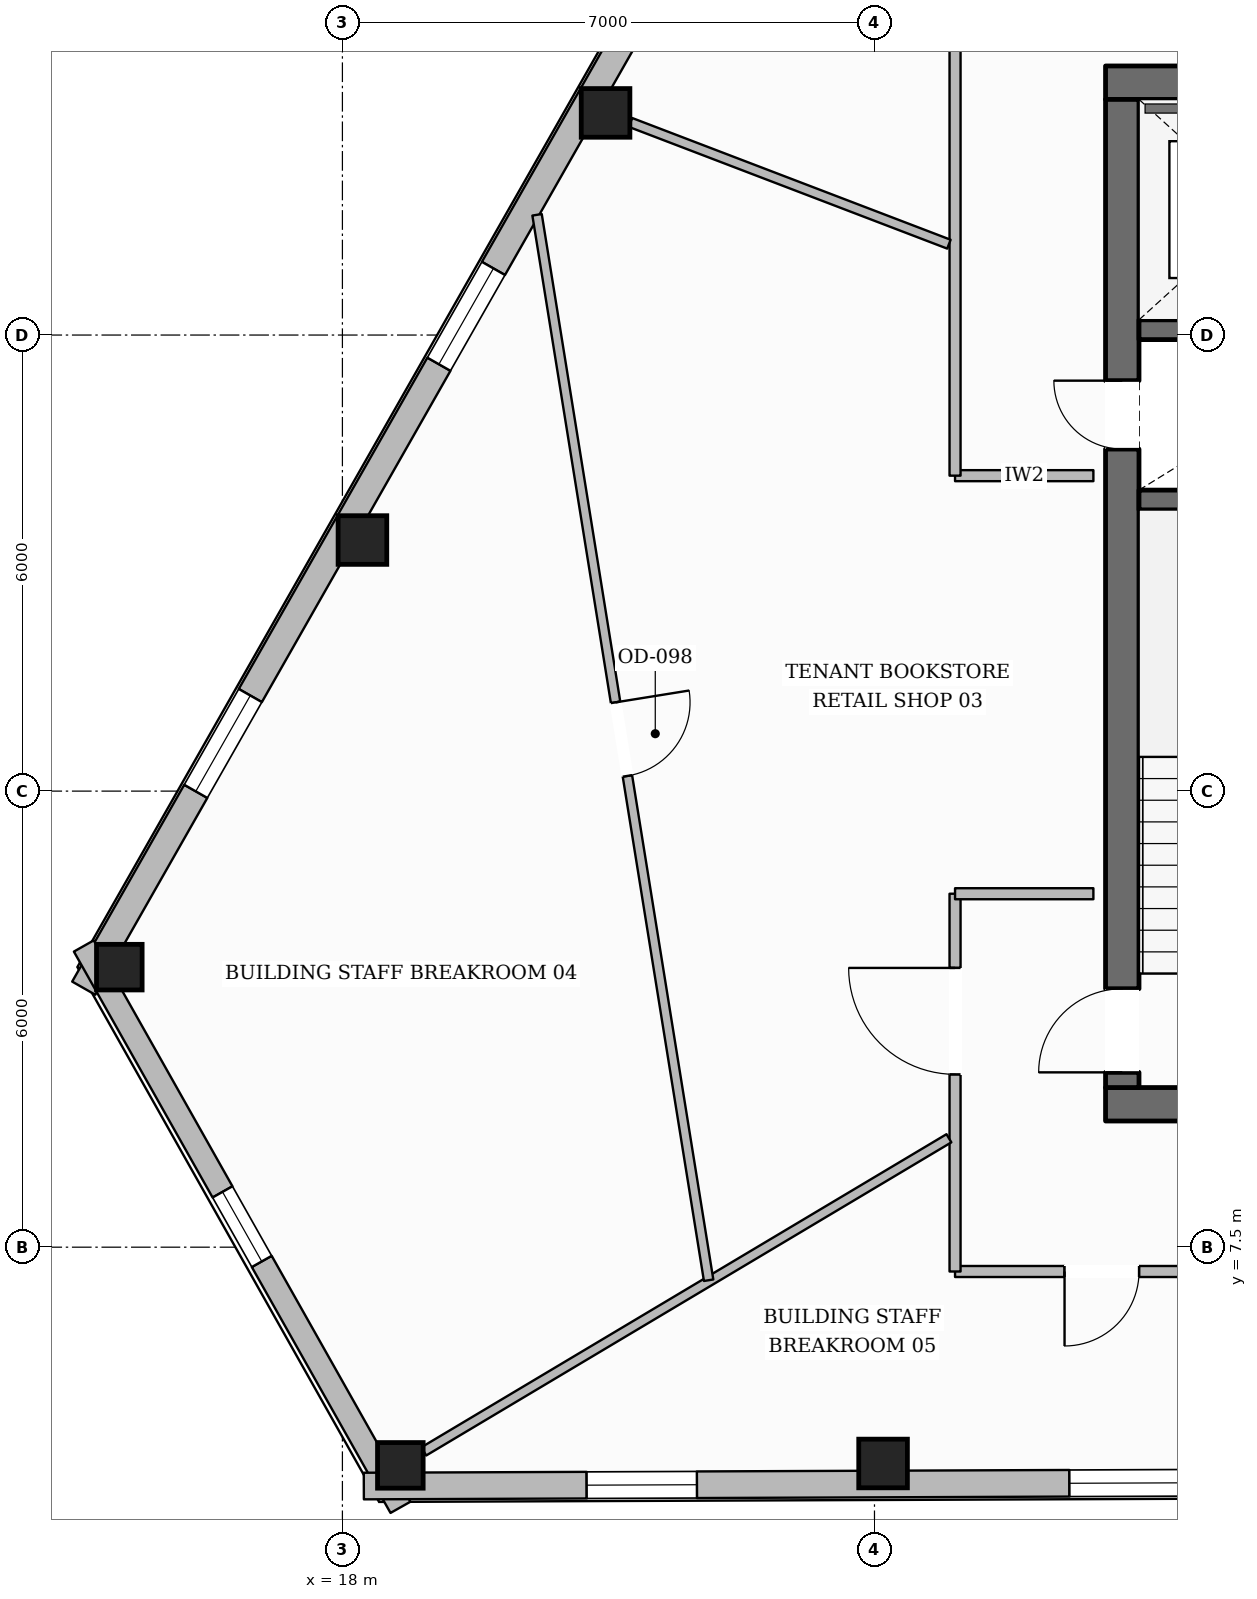
"""IFC4 building model, lengths in metres.
Left out: names, types, materials, properties, quantities, classifications, styles, units other than length and angle.
Written with IfcOpenShell. Run it as: python <this file> out.ifc"""

import sys

from ifc_helpers import new_model, si_unit, direction, frame, frame_2d, origin, origin_2d, place, context, subcontext, project, spatial, rectangle, hollow_rectangle, extrude, element, fill, save


model = new_model("IFC4")
c1 = context("Model", 3, precision=1e-05, world=origin(), true_north=direction((0.0, 1.0)))
c2 = subcontext(c1, "Body", "Model", "MODEL_VIEW")
j1 = project(units=[si_unit("LENGTHUNIT", "METRE"), si_unit("PLANEANGLEUNIT", "RADIAN")], contexts=[c1])
p1 = place(None, origin())
s1 = spatial("IfcSite", under=j1, at=p1, CompositionType="ELEMENT")
p2 = place(p1, origin())
s2 = spatial("IfcBuilding", under=s1, at=p2, CompositionType="ELEMENT")
p3 = place(p2, frame((0.0, 0.0, 230.45)))
s3 = spatial("IfcBuildingStorey", under=s2, at=p3, CompositionType="ELEMENT", Elevation=230.45)
p4 = place(p3, frame((28.04, 9.38, 0.0), z_axis=(0.0, 0.0, 1.0), x_axis=(1.0, 0.0, 0.0)))
e1 = element("IfcWall", 1, at=p4, inside=s3, PredefinedType="SOLIDWALL", context=c2, shape_type="SweptSolid", body=[
    extrude(rectangle(XDim=19.92, YDim=0.44, at=frame_2d((9.96, 0.0))), origin(), (0.0, 0.0, 1.0), 3.43),
])
p5 = place(p4, frame((10.46, 0.0, 0.0)))
e2 = element("IfcOpeningElement", 2, at=p5, cuts=e1, PredefinedType="OPENING", context=c2, shape_type="SweptSolid", body=[
    extrude(rectangle(XDim=1.4, YDim=2.2, at=frame_2d((0.7, 1.1))), frame((0.0, 0.23, 0.0), z_axis=(0.0, -1.0, 0.0), x_axis=(1.0, 0.0, 0.0)), (0.0, 0.0, 1.0), 0.46),
])
p6 = place(p3, frame((28.04, 22.82, 0.0), z_axis=(0.0, 0.0, 1.0), x_axis=(1.0, 0.0, 0.0)))
e3 = element("IfcWall", 3, at=p6, inside=s3, PredefinedType="SOLIDWALL", context=c2, shape_type="SweptSolid", body=[
    extrude(rectangle(XDim=19.92, YDim=0.44, at=frame_2d((9.96, 0.0))), origin(), (0.0, 0.0, 1.0), 3.43),
])
p7 = place(p6, frame((6.235, 0.0, 0.0)))
e4 = element("IfcOpeningElement", 4, at=p7, cuts=e3, PredefinedType="OPENING", context=c2, shape_type="SweptSolid", body=[
    extrude(rectangle(XDim=1.05, YDim=2.15, at=frame_2d((0.525, 1.075))), frame((0.0, 0.23, 0.0), z_axis=(0.0, -1.0, 0.0), x_axis=(1.0, 0.0, 0.0)), (0.0, 0.0, 1.0), 0.46),
])
p8 = place(p6, frame((12.635, 0.0, 0.0)))
e5 = element("IfcOpeningElement", 5, at=p8, cuts=e3, PredefinedType="OPENING", context=c2, shape_type="SweptSolid", body=[
    extrude(rectangle(XDim=1.05, YDim=2.15, at=frame_2d((0.525, 1.075))), frame((0.0, 0.23, 0.0), z_axis=(0.0, -1.0, 0.0), x_axis=(1.0, 0.0, 0.0)), (0.0, 0.0, 1.0), 0.46),
])
p9 = place(p3, frame((28.26, 9.6, 0.0), z_axis=(0.0, 0.0, 1.0), x_axis=(0.0, 1.0, 0.0)))
e6 = element("IfcWall", 6, at=p9, inside=s3, PredefinedType="SOLIDWALL", context=c2, shape_type="SweptSolid", body=[
    extrude(rectangle(XDim=13.0, YDim=0.44, at=frame_2d((6.5, 0.0))), origin(), (0.0, 0.0, 1.0), 3.43),
])
p10 = place(p9, frame((0.2, 0.0, 0.0)))
e7 = element("IfcOpeningElement", 7, at=p10, cuts=e6, PredefinedType="OPENING", context=c2, shape_type="SweptSolid", body=[
    extrude(rectangle(XDim=1.1, YDim=2.15, at=frame_2d((0.55, 1.075))), frame((0.0, 0.23, 0.0), z_axis=(0.0, -1.0, 0.0), x_axis=(1.0, 0.0, 0.0)), (0.0, 0.0, 1.0), 0.46),
])
p11 = place(p9, frame((8.4, 0.0, 0.0)))
e8 = element("IfcOpeningElement", 8, at=p11, cuts=e6, PredefinedType="OPENING", context=c2, shape_type="SweptSolid", body=[
    extrude(rectangle(XDim=0.9, YDim=2.1, at=frame_2d((0.45, 1.05))), frame((0.0, 0.23, 0.0), z_axis=(0.0, -1.0, 0.0), x_axis=(1.0, 0.0, 0.0)), (0.0, 0.0, 1.0), 0.46),
])
for number, where, z_axis, x_axis in (
    (9, (28.48, 17.33, 0.0), (0.0, 0.0, 1.0), (1.0, 0.0, 0.0)),
    (10, (28.48, 19.57, 0.0), (0.0, 0.0, 1.0), (1.0, 0.0, 0.0)),
):
    element("IfcWall", number, at=place(p3, frame(where, z_axis=z_axis, x_axis=x_axis)), inside=s3, PredefinedType="SHEAR", context=c2, shape_type="SweptSolid", body=[
        extrude(rectangle(XDim=3.2, YDim=0.26, at=frame_2d((1.6, 0.0))), origin(), (0.0, 0.0, 1.0), 3.43),
    ])
for number, where, z_axis, x_axis in (
    (11, (21.462, 22.422, 0.0), (0.0, 0.0, 1.0), (1.0, 0.0, 0.0)),
    (12, (18.264, 16.803, 0.0), (0.0, 0.0, 1.0), (1.0, 0.0, 0.0)),
):
    element("IfcColumn", number, at=place(p3, frame(where, z_axis=z_axis, x_axis=x_axis)), inside=s3, PredefinedType="COLUMN", context=c2, shape_type="SweptSolid", body=[
        extrude(hollow_rectangle(XDim=0.64, YDim=0.64, WallThickness=0.028, at=origin_2d()), origin(), (0.0, 0.0, 1.0), 3.43),
    ])
for number, where, z_axis, x_axis in (
    (13, (15.065, 11.184, 0.0), (0.0, 0.0, 1.0), (1.0, 0.0, 0.0)),
    (14, (18.762, 4.629, 0.0), (0.0, 0.0, 1.0), (1.0, 0.0, 0.0)),
):
    element("IfcColumn", number, at=place(p3, frame(where, z_axis=z_axis, x_axis=x_axis)), inside=s3, PredefinedType="COLUMN", context=c2, shape_type="SweptSolid", body=[
        extrude(hollow_rectangle(XDim=0.6, YDim=0.6, WallThickness=0.028, at=origin_2d()), origin(), (0.0, 0.0, 1.0), 3.43),
    ])
p12 = place(p3, frame((25.113, 4.654, 0.0), z_axis=(0.0, 0.0, 1.0), x_axis=(1.0, 0.0, 0.0)))
e15 = element("IfcColumn", 15, at=p12, inside=s3, PredefinedType="COLUMN", context=c2, shape_type="SweptSolid", body=[
    extrude(hollow_rectangle(XDim=0.64, YDim=0.64, WallThickness=0.028, at=origin_2d()), origin(), (0.0, 0.0, 1.0), 3.43),
])
p13 = place(p3, frame((14.597, 10.907, 0.0), z_axis=(0.0, 0.0, 1.0), x_axis=(0.494693460531, 0.869067534837, 0.0)))
e16 = element("IfcWall", 16, at=p13, inside=s3, PredefinedType="STANDARD", context=c2, shape_type="SweptSolid", body=[
    extrude(rectangle(XDim=39.744, YDim=0.35, at=frame_2d((19.872, 0.0))), origin(), (0.0, 0.0, 1.0), 2.962),
])
p14 = place(p13, frame((35.308, 0.0, 0.55)))
e17 = element("IfcOpeningElement", 17, at=p14, cuts=e16, PredefinedType="OPENING", context=c2, shape_type="SweptSolid", body=[
    extrude(rectangle(XDim=1.45, YDim=1.6, at=frame_2d((0.725, 0.8))), frame((0.0, 0.185, 0.0), z_axis=(0.0, -1.0, 0.0), x_axis=(1.0, 0.0, 0.0)), (0.0, 0.0, 1.0), 0.37),
])
p15 = place(p13, frame((28.843, 0.0, 0.55)))
e18 = element("IfcOpeningElement", 18, at=p15, cuts=e16, PredefinedType="OPENING", context=c2, shape_type="SweptSolid", body=[
    extrude(rectangle(XDim=1.45, YDim=1.6, at=frame_2d((0.725, 0.8))), frame((0.0, 0.185, 0.0), z_axis=(0.0, -1.0, 0.0), x_axis=(1.0, 0.0, 0.0)), (0.0, 0.0, 1.0), 0.37),
])
p16 = place(p13, frame((22.377, 0.0, 0.55)))
e19 = element("IfcOpeningElement", 19, at=p16, cuts=e16, PredefinedType="OPENING", context=c2, shape_type="SweptSolid", body=[
    extrude(rectangle(XDim=1.45, YDim=1.6, at=frame_2d((0.725, 0.8))), frame((0.0, 0.185, 0.0), z_axis=(0.0, -1.0, 0.0), x_axis=(1.0, 0.0, 0.0)), (0.0, 0.0, 1.0), 0.37),
])
p17 = place(p13, frame((9.446, 0.0, 0.55)))
e20 = element("IfcOpeningElement", 20, at=p17, cuts=e16, PredefinedType="OPENING", context=c2, shape_type="SweptSolid", body=[
    extrude(rectangle(XDim=1.45, YDim=1.6, at=frame_2d((0.725, 0.8))), frame((0.0, 0.185, 0.0), z_axis=(0.0, -1.0, 0.0), x_axis=(1.0, 0.0, 0.0)), (0.0, 0.0, 1.0), 0.37),
])
p18 = place(p13, frame((2.98, 0.0, 0.55)))
e21 = element("IfcOpeningElement", 21, at=p18, cuts=e16, PredefinedType="OPENING", context=c2, shape_type="SweptSolid", body=[
    extrude(rectangle(XDim=1.45, YDim=1.6, at=frame_2d((0.725, 0.8))), frame((0.0, 0.185, 0.0), z_axis=(0.0, -1.0, 0.0), x_axis=(1.0, 0.0, 0.0)), (0.0, 0.0, 1.0), 0.37),
])
p19 = place(p3, frame((18.764, 4.077, 0.0), z_axis=(0.0, 0.0, 1.0), x_axis=(-0.491297103915, 0.870992052595, 0.0)))
e22 = element("IfcWall", 22, at=p19, inside=s3, PredefinedType="STANDARD", context=c2, shape_type="SweptSolid", body=[
    extrude(rectangle(XDim=8.479, YDim=0.3, at=frame_2d((4.24, 0.0))), origin(), (0.0, 0.0, 1.0), 2.962),
])
p20 = place(p19, frame((3.715, 0.0, 0.65)))
e23 = element("IfcOpeningElement", 23, at=p20, cuts=e22, PredefinedType="OPENING", context=c2, shape_type="SweptSolid", body=[
    extrude(rectangle(XDim=1.05, YDim=1.55, at=frame_2d((0.525, 0.775))), frame((0.0, 0.16, 0.0), z_axis=(0.0, -1.0, 0.0), x_axis=(1.0, 0.0, 0.0)), (0.0, 0.0, 1.0), 0.32),
])
p21 = place(p3, frame((57.346, 4.51, 0.0), z_axis=(0.0, 0.0, 1.0), x_axis=(-0.999992347121, -0.003912249994, 0.0)))
e24 = element("IfcWall", 24, at=p21, inside=s3, PredefinedType="STANDARD", context=c2, shape_type="SweptSolid", body=[
    extrude(rectangle(XDim=39.065, YDim=0.35, at=frame_2d((19.532, 0.0))), origin(), (0.0, 0.0, 1.0), 2.962),
])
p22 = place(p21, frame((9.366, 0.0, 0.0)))
e25 = element("IfcOpeningElement", 25, at=p22, cuts=e24, PredefinedType="OPENING", context=c2, shape_type="SweptSolid", body=[
    extrude(rectangle(XDim=1.0, YDim=2.2, at=frame_2d((0.5, 1.1))), frame((0.0, 0.185, 0.0), z_axis=(0.0, -1.0, 0.0), x_axis=(1.0, 0.0, 0.0)), (0.0, 0.0, 1.0), 0.37),
])
p23 = place(p21, frame((34.683, 0.0, 0.55)))
e26 = element("IfcOpeningElement", 26, at=p23, cuts=e24, PredefinedType="OPENING", context=c2, shape_type="SweptSolid", body=[
    extrude(rectangle(XDim=1.45, YDim=1.6, at=frame_2d((0.725, 0.8))), frame((0.0, 0.185, 0.0), z_axis=(0.0, -1.0, 0.0), x_axis=(1.0, 0.0, 0.0)), (0.0, 0.0, 1.0), 0.37),
])
p24 = place(p21, frame((28.332, 0.0, 0.55)))
e27 = element("IfcOpeningElement", 27, at=p24, cuts=e24, PredefinedType="OPENING", context=c2, shape_type="SweptSolid", body=[
    extrude(rectangle(XDim=1.45, YDim=1.6, at=frame_2d((0.725, 0.8))), frame((0.0, 0.185, 0.0), z_axis=(0.0, -1.0, 0.0), x_axis=(1.0, 0.0, 0.0)), (0.0, 0.0, 1.0), 0.37),
])
p25 = place(p21, frame((21.981, 0.0, 0.55)))
e28 = element("IfcOpeningElement", 28, at=p25, cuts=e24, PredefinedType="OPENING", context=c2, shape_type="SweptSolid", body=[
    extrude(rectangle(XDim=1.45, YDim=1.6, at=frame_2d((0.725, 0.8))), frame((0.0, 0.185, 0.0), z_axis=(0.0, -1.0, 0.0), x_axis=(1.0, 0.0, 0.0)), (0.0, 0.0, 1.0), 0.37),
])
p26 = place(p21, frame((2.928, 0.0, 0.55)))
e29 = element("IfcOpeningElement", 29, at=p26, cuts=e24, PredefinedType="OPENING", context=c2, shape_type="SweptSolid", body=[
    extrude(rectangle(XDim=1.45, YDim=1.6, at=frame_2d((0.725, 0.8))), frame((0.0, 0.185, 0.0), z_axis=(0.0, -1.0, 0.0), x_axis=(1.0, 0.0, 0.0)), (0.0, 0.0, 1.0), 0.37),
])
p27 = place(p3, frame((27.88, 17.65, 0.0), z_axis=(0.0, 0.0, 1.0), x_axis=(-1.0, 0.0, 0.0)))
e30 = element("IfcWall", 30, at=p27, inside=s3, PredefinedType="PARTITIONING", context=c2, shape_type="SweptSolid", body=[
    extrude(rectangle(XDim=1.82, YDim=0.145, at=frame_2d((0.91, 0.0))), origin(), (0.0, 0.0, 1.0), 3.43),
])
p28 = place(p3, frame((26.06, 17.65, 0.0), z_axis=(0.0, 0.0, 1.0), x_axis=(0.0, 1.0, 0.0)))
e31 = element("IfcWall", 31, at=p28, inside=s3, PredefinedType="PARTITIONING", context=c2, shape_type="SweptSolid", body=[
    extrude(rectangle(XDim=7.37, YDim=0.145, at=frame_2d((3.685, 0.0))), origin(), (0.0, 0.0, 1.0), 3.169),
])
p29 = place(p3, frame((49.94, 7.18, 0.0), z_axis=(0.0, 0.0, 1.0), x_axis=(-1.0, 0.0, 0.0)))
e32 = element("IfcWall", 32, at=p29, inside=s3, PredefinedType="PARTITIONING", context=c2, shape_type="SweptSolid", body=[
    extrude(rectangle(XDim=23.88, YDim=0.145, at=frame_2d((11.94, 0.0))), origin(), (0.0, 0.0, 1.0), 3.169),
])
p30 = place(p29, frame((18.5, 0.0, 0.0)))
e33 = element("IfcOpeningElement", 33, at=p30, cuts=e32, PredefinedType="OPENING", context=c2, shape_type="SweptSolid", body=[
    extrude(rectangle(XDim=0.88, YDim=2.1, at=frame_2d((0.44, 1.05))), frame((0.0, 0.083, 0.0), z_axis=(0.0, -1.0, 0.0), x_axis=(1.0, 0.0, 0.0)), (0.0, 0.0, 1.0), 0.165),
])
p31 = place(p29, frame((15.98, 0.0, 0.0)))
e34 = element("IfcOpeningElement", 34, at=p31, cuts=e32, PredefinedType="OPENING", context=c2, shape_type="SweptSolid", body=[
    extrude(rectangle(XDim=0.88, YDim=2.1, at=frame_2d((0.44, 1.05))), frame((0.0, 0.083, 0.0), z_axis=(0.0, -1.0, 0.0), x_axis=(1.0, 0.0, 0.0)), (0.0, 0.0, 1.0), 0.165),
])
p32 = place(p29, frame((13.52, 0.0, 0.0)))
e35 = element("IfcOpeningElement", 35, at=p32, cuts=e32, PredefinedType="OPENING", context=c2, shape_type="SweptSolid", body=[
    extrude(rectangle(XDim=0.96, YDim=2.1, at=frame_2d((0.48, 1.05))), frame((0.0, 0.083, 0.0), z_axis=(0.0, -1.0, 0.0), x_axis=(1.0, 0.0, 0.0)), (0.0, 0.0, 1.0), 0.165),
])
p33 = place(p29, frame((21.459, 0.0, 0.0)))
e36 = element("IfcOpeningElement", 36, at=p33, cuts=e32, PredefinedType="OPENING", context=c2, shape_type="SweptSolid", body=[
    extrude(rectangle(XDim=0.98, YDim=2.15, at=frame_2d((0.49, 1.075))), frame((0.0, 0.083, 0.0), z_axis=(0.0, -1.0, 0.0), x_axis=(1.0, 0.0, 0.0)), (0.0, 0.0, 1.0), 0.165),
])
p34 = place(p29, frame((6.99, 0.0, 0.0)))
e37 = element("IfcOpeningElement", 37, at=p34, cuts=e32, PredefinedType="OPENING", context=c2, shape_type="SweptSolid", body=[
    extrude(rectangle(XDim=0.98, YDim=2.15, at=frame_2d((0.49, 1.075))), frame((0.0, 0.083, 0.0), z_axis=(0.0, -1.0, 0.0), x_axis=(1.0, 0.0, 0.0)), (0.0, 0.0, 1.0), 0.165),
])
p35 = place(p3, frame((26.06, 7.18, 0.0), z_axis=(0.0, 0.0, 1.0), x_axis=(0.0, 1.0, 0.0)))
e38 = element("IfcWall", 38, at=p35, inside=s3, PredefinedType="PARTITIONING", context=c2, shape_type="SweptSolid", body=[
    extrude(rectangle(XDim=4.97, YDim=0.145, at=frame_2d((2.485, 0.0))), origin(), (0.0, 0.0, 1.0), 3.43),
])
p36 = place(p35, frame((2.594, 0.0, 0.0)))
e39 = element("IfcOpeningElement", 39, at=p36, cuts=e38, PredefinedType="OPENING", context=c2, shape_type="SweptSolid", body=[
    extrude(rectangle(XDim=1.4, YDim=2.2, at=frame_2d((0.7, 1.1))), frame((0.0, 0.083, 0.0), z_axis=(0.0, -1.0, 0.0), x_axis=(1.0, 0.0, 0.0)), (0.0, 0.0, 1.0), 0.165),
])
p37 = place(p3, frame((26.06, 12.15, 0.0), z_axis=(0.0, 0.0, 1.0), x_axis=(1.0, 0.0, 0.0)))
e40 = element("IfcWall", 40, at=p37, inside=s3, PredefinedType="PARTITIONING", context=c2, shape_type="SweptSolid", body=[
    extrude(rectangle(XDim=1.82, YDim=0.145, at=frame_2d((0.91, 0.0))), origin(), (0.0, 0.0, 1.0), 3.43),
])
p38 = place(p3, frame((25.979, 20.695, 0.0), z_axis=(0.0, 0.0, 1.0), x_axis=(-0.934055039119, 0.357129085761, 0.0)))
e41 = element("IfcWall", 41, at=p38, inside=s3, PredefinedType="PARTITIONING", context=c2, shape_type="SweptSolid", body=[
    extrude(rectangle(XDim=4.485, YDim=0.125, at=frame_2d((2.243, 0.0))), origin(), (0.0, 0.0, 1.0), 3.43),
])
p39 = place(p3, frame((25.979, 8.933, 0.0), z_axis=(0.0, 0.0, 1.0), x_axis=(-0.858895628023, -0.512150661586, 0.0)))
e42 = element("IfcWall", 42, at=p39, inside=s3, PredefinedType="PARTITIONING", context=c2, shape_type="SweptSolid", body=[
    extrude(rectangle(XDim=8.044, YDim=0.125, at=frame_2d((4.022, 0.0))), origin(), (0.0, 0.0, 1.0), 2.971),
])
p40 = place(p3, frame((20.561, 21.082, 0.0), z_axis=(0.0, 0.0, 1.0), x_axis=(0.158981027385, -0.987281638101, 0.0)))
e43 = element("IfcWall", 43, at=p40, inside=s3, PredefinedType="PARTITIONING", context=c2, shape_type="SweptSolid", body=[
    extrude(rectangle(XDim=14.197, YDim=0.125, at=frame_2d((7.099, 0.0))), origin(), (0.0, 0.0, 1.0), 3.169),
])
p41 = place(p40, frame((6.497, 0.0, 0.0)))
e44 = element("IfcOpeningElement", 44, at=p41, cuts=e43, PredefinedType="OPENING", context=c2, shape_type="SweptSolid", body=[
    extrude(rectangle(XDim=0.98, YDim=2.15, at=frame_2d((0.49, 1.075))), frame((0.0, 0.073, 0.0), z_axis=(0.0, -1.0, 0.0), x_axis=(1.0, 0.0, 0.0)), (0.0, 0.0, 1.0), 0.145),
])
p42 = place(p17, origin())
e45 = element("IfcWindow", 45, at=p42, inside=s3, PartitioningType="SINGLE_PANEL", PredefinedType="WINDOW", context=c2, shape_type="SweptSolid", body=[
    extrude(rectangle(XDim=1.45, YDim=1.6, at=frame_2d((0.725, 0.8))), frame((0.0, 0.03, 0.0), z_axis=(0.0, -1.0, 0.0), x_axis=(1.0, 0.0, 0.0)), (0.0, 0.0, 1.0), 0.06),
])
fill(e20, e45)
p43 = place(p18, origin())
e46 = element("IfcWindow", 46, at=p43, inside=s3, PartitioningType="SINGLE_PANEL", PredefinedType="WINDOW", context=c2, shape_type="SweptSolid", body=[
    extrude(rectangle(XDim=1.45, YDim=1.6, at=frame_2d((0.725, 0.8))), frame((0.0, 0.03, 0.0), z_axis=(0.0, -1.0, 0.0), x_axis=(1.0, 0.0, 0.0)), (0.0, 0.0, 1.0), 0.06),
])
fill(e21, e46)
p44 = place(p23, origin())
e47 = element("IfcWindow", 47, at=p44, inside=s3, PartitioningType="SINGLE_PANEL", PredefinedType="WINDOW", context=c2, shape_type="SweptSolid", body=[
    extrude(rectangle(XDim=1.45, YDim=1.6, at=frame_2d((0.725, 0.8))), frame((0.0, 0.03, 0.0), z_axis=(0.0, -1.0, 0.0), x_axis=(1.0, 0.0, 0.0)), (0.0, 0.0, 1.0), 0.06),
])
fill(e26, e47)
p45 = place(p24, origin())
e48 = element("IfcWindow", 48, at=p45, inside=s3, PartitioningType="SINGLE_PANEL", PredefinedType="WINDOW", context=c2, shape_type="SweptSolid", body=[
    extrude(rectangle(XDim=1.45, YDim=1.6, at=frame_2d((0.725, 0.8))), frame((0.0, 0.03, 0.0), z_axis=(0.0, -1.0, 0.0), x_axis=(1.0, 0.0, 0.0)), (0.0, 0.0, 1.0), 0.06),
])
fill(e27, e48)
p46 = place(p20, origin())
e49 = element("IfcWindow", 49, at=p46, inside=s3, PartitioningType="SINGLE_PANEL", PredefinedType="WINDOW", context=c2, shape_type="SweptSolid", body=[
    extrude(rectangle(XDim=1.05, YDim=1.55, at=frame_2d((0.525, 0.775))), frame((0.0, 0.03, 0.0), z_axis=(0.0, -1.0, 0.0), x_axis=(1.0, 0.0, 0.0)), (0.0, 0.0, 1.0), 0.06),
])
fill(e23, e49)
p47 = place(p10, origin())
e50 = element("IfcDoor", 50, at=p47, inside=s3, OperationType="SINGLE_SWING_LEFT", PredefinedType="DOOR", context=c2, shape_type="SweptSolid", body=[
    extrude(rectangle(XDim=1.1, YDim=2.15, at=frame_2d((0.55, 1.075))), frame((0.0, 0.025, 0.0), z_axis=(0.0, -1.0, 0.0), x_axis=(1.0, 0.0, 0.0)), (0.0, 0.0, 1.0), 0.05),
])
fill(e7, e50)
p48 = place(p11, origin())
e51 = element("IfcDoor", 51, at=p48, inside=s3, OperationType="SINGLE_SWING_RIGHT", PredefinedType="DOOR", context=c2, shape_type="SweptSolid", body=[
    extrude(rectangle(XDim=0.9, YDim=2.1, at=frame_2d((0.45, 1.05))), frame((0.0, 0.025, 0.0), z_axis=(0.0, -1.0, 0.0), x_axis=(1.0, 0.0, 0.0)), (0.0, 0.0, 1.0), 0.05),
])
fill(e8, e51)
p49 = place(p36, origin())
e52 = element("IfcDoor", 52, at=p49, inside=s3, OperationType="SINGLE_SWING_RIGHT", PredefinedType="DOOR", context=c2, shape_type="SweptSolid", body=[
    extrude(rectangle(XDim=1.4, YDim=2.2, at=frame_2d((0.7, 1.1))), frame((0.0, 0.025, 0.0), z_axis=(0.0, -1.0, 0.0), x_axis=(1.0, 0.0, 0.0)), (0.0, 0.0, 1.0), 0.05),
])
fill(e39, e52)
p50 = place(p41, origin())
e53 = element("IfcDoor", 53, at=p50, inside=s3, OperationType="SINGLE_SWING_LEFT", PredefinedType="DOOR", context=c2, shape_type="SweptSolid", body=[
    extrude(rectangle(XDim=0.98, YDim=2.15, at=frame_2d((0.49, 1.075))), frame((0.0, 0.025, 0.0), z_axis=(0.0, -1.0, 0.0), x_axis=(1.0, 0.0, 0.0)), (0.0, 0.0, 1.0), 0.05),
])
fill(e44, e53)
p51 = place(p33, origin())
e54 = element("IfcDoor", 54, at=p51, inside=s3, OperationType="SINGLE_SWING_RIGHT", PredefinedType="DOOR", context=c2, shape_type="SweptSolid", body=[
    extrude(rectangle(XDim=0.98, YDim=2.15, at=frame_2d((0.49, 1.075))), frame((0.0, 0.025, 0.0), z_axis=(0.0, -1.0, 0.0), x_axis=(1.0, 0.0, 0.0)), (0.0, 0.0, 1.0), 0.05),
])
fill(e36, e54)
save(model, sys.argv[1])
